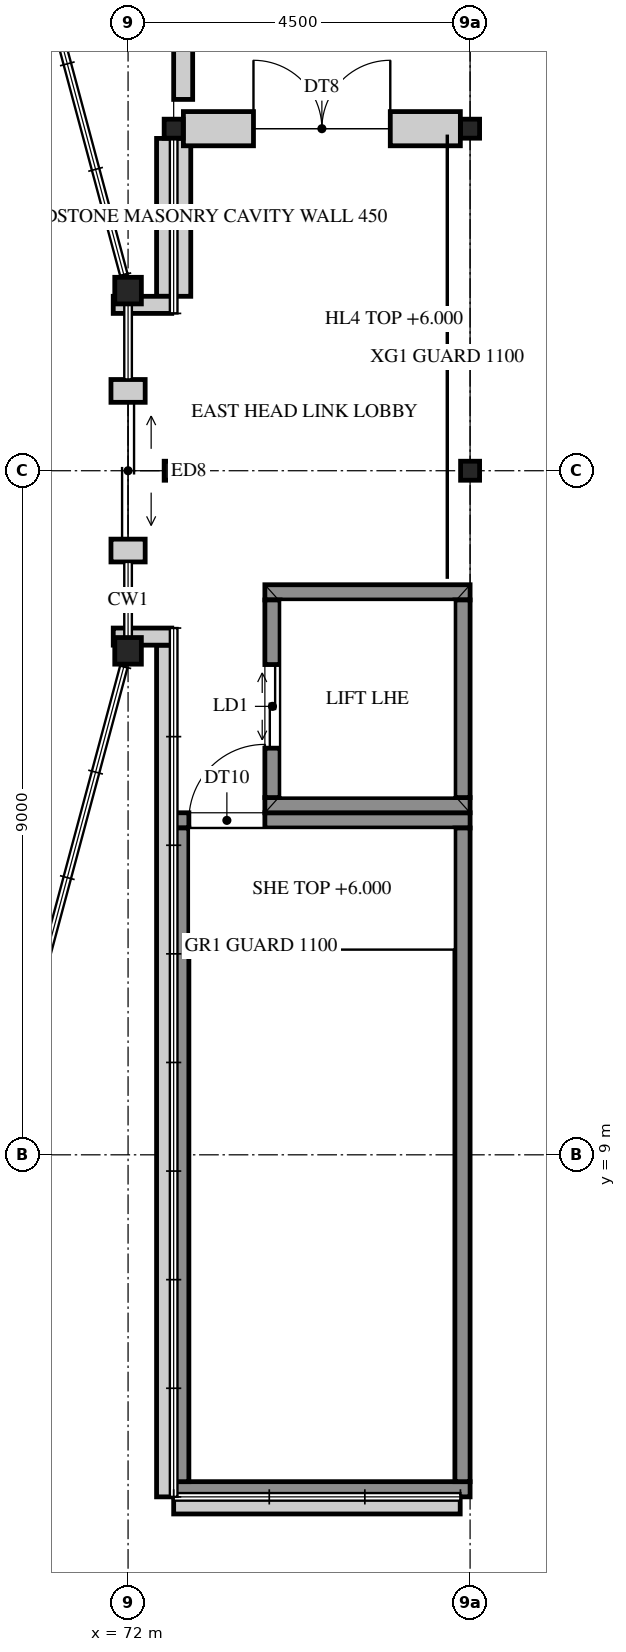
"""IFC4 building model, lengths in metres.
Left out: names, types, materials, properties, quantities, classifications, styles, units other than length and angle.
Written with IfcOpenShell. Run it as: python <this file> out.ifc"""

import sys

from ifc_helpers import new_model, si_unit, direction, frame, frame_2d, origin, origin_2d, place, context, subcontext, project, spatial, rectangle, hollow_rectangle, extrude, element, fill, save


model = new_model("IFC4")
c1 = context("Model", 3, precision=1e-05, world=origin(), true_north=direction((0.0, 1.0)))
c2 = subcontext(c1, "Body", "Model", "MODEL_VIEW")
j1 = project(units=[si_unit("LENGTHUNIT", "METRE"), si_unit("PLANEANGLEUNIT", "RADIAN")], contexts=[c1])
p1 = place(None, origin())
s1 = spatial("IfcSite", under=j1, at=p1, CompositionType="ELEMENT")
p2 = place(p1, origin())
s2 = spatial("IfcBuilding", under=s1, at=p2, CompositionType="ELEMENT")
p3 = place(p2, frame((0.0, 0.0, 6.0)))
s3 = spatial("IfcBuildingStorey", under=s2, at=p3, CompositionType="ELEMENT", Elevation=6.0)
for number, where, z_axis, x_axis in (
    (1, (72.0, 20.37, 0.0), (0.0, 0.0, 1.0), (1.0, 0.0, 0.0)),
    (2, (72.0, 15.63, 0.0), (0.0, 0.0, 1.0), (1.0, 0.0, 0.0)),
):
    element("IfcColumn", number, at=place(p3, frame(where, z_axis=z_axis, x_axis=x_axis)), inside=s3, PredefinedType="COLUMN", context=c2, shape_type="SweptSolid", body=[
        extrude(hollow_rectangle(XDim=0.35, YDim=0.35, WallThickness=0.012, InnerFilletRadius=0.019, OuterFilletRadius=0.031, at=origin_2d()), origin(), (0.0, 0.0, 1.0), 4.3),
    ])
p4 = place(p3, frame((72.6, 4.6, 0.0), z_axis=(0.0, 0.0, 1.0), x_axis=(1.0, 0.0, 0.0)))
e3 = element("IfcWall", 3, at=p4, inside=s3, PredefinedType="SHEAR", context=c2, shape_type="SweptSolid", body=[
    extrude(rectangle(XDim=3.9, YDim=0.2, at=frame_2d((1.95, 0.0))), origin(), (0.0, 0.0, 1.0), 4.5),
])
p5 = place(p3, frame((72.6, 13.4, 0.0), z_axis=(0.0, 0.0, 1.0), x_axis=(1.0, 0.0, 0.0)))
e4 = element("IfcWall", 4, at=p5, inside=s3, PredefinedType="SHEAR", context=c2, shape_type="SweptSolid", body=[
    extrude(rectangle(XDim=3.9, YDim=0.2, at=frame_2d((1.95, 0.0))), origin(), (0.0, 0.0, 1.0), 4.5),
])
p6 = place(p5, frame((0.2, 0.0, 0.0)))
e5 = element("IfcOpeningElement", 5, at=p6, cuts=e4, PredefinedType="OPENING", context=c2, shape_type="SweptSolid", body=[
    extrude(rectangle(XDim=1.0, YDim=2.1, at=frame_2d((0.5, 1.05))), frame((0.0, 0.11, 0.0), z_axis=(0.0, -1.0, 0.0), x_axis=(1.0, 0.0, 0.0)), (0.0, 0.0, 1.0), 0.22),
])
for number, where, z_axis, x_axis in (
    (6, (72.7, 4.7, 0.0), (0.0, 0.0, 1.0), (0.0, 1.0, 0.0)),
    (7, (76.4, 4.7, 0.0), (0.0, 0.0, 1.0), (0.0, 1.0, 0.0)),
):
    element("IfcWall", number, at=place(p3, frame(where, z_axis=z_axis, x_axis=x_axis)), inside=s3, PredefinedType="SHEAR", context=c2, shape_type="SweptSolid", body=[
        extrude(rectangle(XDim=8.6, YDim=0.2, at=frame_2d((4.3, 0.0))), origin(), (0.0, 0.0, 1.0), 4.5),
    ])
for number, where, z_axis, x_axis in (
    (8, (73.8, 13.6, 0.0), (0.0, 0.0, 1.0), (1.0, 0.0, 0.0)),
    (9, (73.8, 16.4, 0.0), (0.0, 0.0, 1.0), (1.0, 0.0, 0.0)),
):
    element("IfcWall", number, at=place(p3, frame(where, z_axis=z_axis, x_axis=x_axis)), inside=s3, PredefinedType="SHEAR", context=c2, shape_type="SweptSolid", body=[
        extrude(rectangle(XDim=2.7, YDim=0.2, at=frame_2d((1.35, 0.0))), origin(), (0.0, 0.0, 1.0), 4.5),
    ])
p7 = place(p3, frame((73.9, 13.7, 0.0), z_axis=(0.0, 0.0, 1.0), x_axis=(0.0, 1.0, 0.0)))
e10 = element("IfcWall", 10, at=p7, inside=s3, PredefinedType="SHEAR", context=c2, shape_type="SweptSolid", body=[
    extrude(rectangle(XDim=2.6, YDim=0.2, at=frame_2d((1.3, 0.0))), origin(), (0.0, 0.0, 1.0), 4.5),
])
p8 = place(p7, frame((0.65, 0.0, 0.0)))
e11 = element("IfcOpeningElement", 11, at=p8, cuts=e10, PredefinedType="OPENING", context=c2, shape_type="SweptSolid", body=[
    extrude(rectangle(XDim=1.1, YDim=2.1, at=frame_2d((0.55, 1.05))), frame((0.0, 0.11, 0.0), z_axis=(0.0, -1.0, 0.0), x_axis=(1.0, 0.0, 0.0)), (0.0, 0.0, 1.0), 0.22),
])
p9 = place(p3, frame((76.4, 13.7, 0.0), z_axis=(0.0, 0.0, 1.0), x_axis=(0.0, 1.0, 0.0)))
e12 = element("IfcWall", 12, at=p9, inside=s3, PredefinedType="SHEAR", context=c2, shape_type="SweptSolid", body=[
    extrude(rectangle(XDim=2.6, YDim=0.2, at=frame_2d((1.3, 0.0))), origin(), (0.0, 0.0, 1.0), 4.5),
])
for number, where, z_axis, x_axis in (
    (13, (72.6, 18.0, 0.0), (0.0, 0.0, 1.0), (1.0, 0.0, 0.0)),
    (14, (76.5, 18.0, 0.0), (0.0, 0.0, 1.0), (1.0, 0.0, 0.0)),
    (15, (72.6, 22.5, 0.0), (0.0, 0.0, 1.0), (1.0, 0.0, 0.0)),
    (16, (76.5, 22.5, 0.0), (0.0, 0.0, 1.0), (1.0, 0.0, 0.0)),
):
    element("IfcColumn", number, at=place(p3, frame(where, z_axis=z_axis, x_axis=x_axis)), inside=s3, PredefinedType="COLUMN", context=c2, shape_type="SweptSolid", body=[
        extrude(hollow_rectangle(XDim=0.25, YDim=0.25, WallThickness=0.009, InnerFilletRadius=0.013, OuterFilletRadius=0.022, at=origin_2d()), origin(), (0.0, 0.0, 1.0), 4.046),
    ])
p10 = place(p3, frame((72.0, 19.2, 0.0), z_axis=(0.0, 0.0, 1.0), x_axis=(0.0, -1.0, 0.0)))
e17 = element("IfcWall", 17, at=p10, inside=s3, PredefinedType="STANDARD", context=c2, shape_type="SweptSolid", body=[
    extrude(rectangle(XDim=2.4, YDim=0.45, at=frame_2d((1.2, 0.0))), origin(), (0.0, 0.0, 1.0), 3.75),
])
p11 = place(p10, frame((0.3, 0.0, 0.012)))
e18 = element("IfcOpeningElement", 18, at=p11, cuts=e17, PredefinedType="OPENING", context=c2, shape_type="SweptSolid", body=[
    extrude(rectangle(XDim=1.8, YDim=2.4, at=frame_2d((0.9, 1.2))), frame((0.0, 0.235, 0.0), z_axis=(0.0, -1.0, 0.0), x_axis=(1.0, 0.0, 0.0)), (0.0, 0.0, 1.0), 0.47),
])
p12 = place(p3, frame((76.37, 4.387, 0.0), z_axis=(0.0, 0.0, 1.0), x_axis=(-1.0, 0.0, 0.0)))
e19 = element("IfcWall", 19, at=p12, inside=s3, PredefinedType="STANDARD", context=c2, shape_type="SweptSolid", body=[
    extrude(rectangle(XDim=3.77, YDim=0.225, at=frame_2d((1.885, 0.0))), origin(), (0.0, 0.0, 1.0), 0.9),
])
p13 = place(p3, frame((72.488, 4.5, 0.0), z_axis=(0.0, 0.0, 1.0), x_axis=(0.0, 1.0, 0.0)))
e20 = element("IfcWall", 20, at=p13, inside=s3, PredefinedType="STANDARD", context=c2, shape_type="SweptSolid", body=[
    extrude(rectangle(XDim=11.205, YDim=0.225, at=frame_2d((5.603, 0.0))), origin(), (0.0, 0.0, 1.0), 0.9),
])
p14 = place(p3, frame((72.6, 20.295, 0.0), z_axis=(0.0, 0.0, 1.0), x_axis=(0.0, 1.0, 0.0)))
e21 = element("IfcWall", 21, at=p14, inside=s3, PredefinedType="STANDARD", context=c2, shape_type="SweptSolid", body=[
    extrude(rectangle(XDim=2.077, YDim=0.45, at=frame_2d((1.039, 0.0))), origin(), (0.0, 0.0, 1.0), 0.9),
])
for number, where, z_axis, x_axis in (
    (22, (71.805, 15.818, 0.0), (0.0, 0.0, 1.0), (1.0, 0.0, 0.0)),
    (23, (71.805, 20.182, 0.0), (0.0, 0.0, 1.0), (1.0, 0.0, 0.0)),
):
    element("IfcWall", number, at=place(p3, frame(where, z_axis=z_axis, x_axis=x_axis)), inside=s3, PredefinedType="STANDARD", context=c2, shape_type="SweptSolid", body=[
        extrude(rectangle(XDim=0.77, YDim=0.225, at=frame_2d((0.385, 0.0))), origin(), (0.0, 0.0, 1.0), 3.74),
    ])
p15 = place(p3, frame((72.728, 22.5, 0.0), z_axis=(0.0, 0.0, 1.0), x_axis=(1.0, 0.0, 0.0)))
e24 = element("IfcWall", 24, at=p15, inside=s3, PredefinedType="STANDARD", context=c2, shape_type="SweptSolid", body=[
    extrude(rectangle(XDim=3.644, YDim=0.45, at=frame_2d((1.822, 0.0))), origin(), (0.0, 0.0, 1.0), 3.74),
])
p16 = place(p15, frame((0.922, 0.0, 0.0)))
e25 = element("IfcOpeningElement", 25, at=p16, cuts=e24, PredefinedType="OPENING", context=c2, shape_type="SweptSolid", body=[
    extrude(rectangle(XDim=1.8, YDim=2.1, at=frame_2d((0.9, 1.05))), frame((0.0, 0.235, 0.0), z_axis=(0.0, -1.0, 0.0), x_axis=(1.0, 0.0, 0.0)), (0.0, 0.0, 1.0), 0.47),
])
p17 = place(p3, frame((72.725, 22.885, 0.0), z_axis=(0.0, 0.0, 1.0), x_axis=(0.0, 1.0, 0.0)))
e26 = element("IfcWall", 26, at=p17, inside=s3, PredefinedType="PARAPET", context=c2, shape_type="SweptSolid", body=[
    extrude(rectangle(XDim=12.73, YDim=0.25, at=frame_2d((6.365, 0.0))), origin(), (0.0, 0.0, 1.0), 1.1),
])
p18 = place(p11, origin())
e27 = element("IfcDoor", 27, at=p18, inside=s3, OperationType="DOUBLE_DOOR_SLIDING", PredefinedType="DOOR", context=c2, shape_type="SweptSolid", body=[
    extrude(rectangle(XDim=1.8, YDim=2.4, at=frame_2d((0.9, 1.2))), frame((0.0, 0.025, 0.0), z_axis=(0.0, -1.0, 0.0), x_axis=(1.0, 0.0, 0.0)), (0.0, 0.0, 1.0), 0.05),
])
fill(e18, e27)
p19 = place(p16, origin())
e28 = element("IfcDoor", 28, at=p19, inside=s3, OperationType="DOUBLE_DOOR_SINGLE_SWING", PredefinedType="DOOR", context=c2, shape_type="SweptSolid", body=[
    extrude(rectangle(XDim=1.8, YDim=2.1, at=frame_2d((0.9, 1.05))), frame((0.0, 0.025, 0.0), z_axis=(0.0, -1.0, 0.0), x_axis=(1.0, 0.0, 0.0)), (0.0, 0.0, 1.0), 0.05),
])
fill(e25, e28)
p20 = place(p6, frame((1.0, 0.0, 0.0), z_axis=(0.0, 0.0, 1.0), x_axis=(-1.0, 0.0, 0.0)))
e29 = element("IfcDoor", 29, at=p20, inside=s3, OperationType="SINGLE_SWING_RIGHT", PredefinedType="DOOR", context=c2, shape_type="SweptSolid", body=[
    extrude(rectangle(XDim=1.0, YDim=2.1, at=frame_2d((0.5, 1.05))), frame((0.0, 0.025, 0.0), z_axis=(0.0, -1.0, 0.0), x_axis=(1.0, 0.0, 0.0)), (0.0, 0.0, 1.0), 0.05),
])
fill(e5, e29)
p21 = place(p8, origin())
e30 = element("IfcDoor", 30, at=p21, inside=s3, OperationType="DOUBLE_DOOR_SLIDING", PredefinedType="DOOR", context=c2, shape_type="SweptSolid", body=[
    extrude(rectangle(XDim=1.1, YDim=2.1, at=frame_2d((0.55, 1.05))), frame((0.0, 0.025, 0.0), z_axis=(0.0, -1.0, 0.0), x_axis=(1.0, 0.0, 0.0)), (0.0, 0.0, 1.0), 0.05),
])
fill(e11, e30)
save(model, sys.argv[1])
